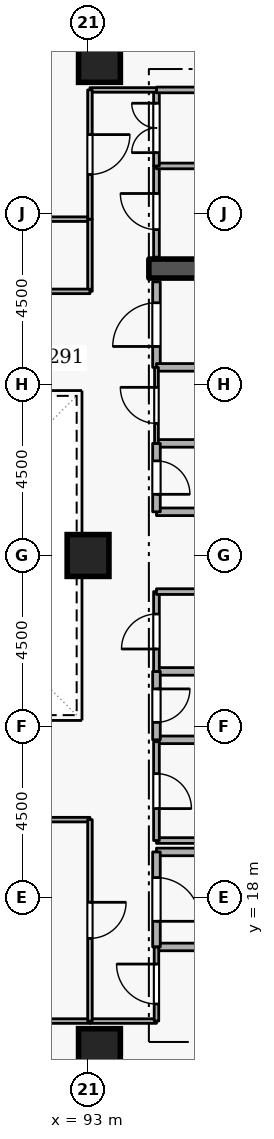
"""IFC4 building model, lengths in metres.
Left out: names, types, materials, properties, quantities, classifications, styles, units other than length and angle.
Written with IfcOpenShell. Run it as: python <this file> out.ifc"""

import sys

from ifc_helpers import new_model, si_unit, direction, frame, frame_2d, origin, origin_2d, place, context, subcontext, project, spatial, rectangle, extrude, element, fill, save


model = new_model("IFC4")
c1 = context("Model", 3, precision=1e-05, world=origin(), true_north=direction((0.0, 1.0)))
c2 = subcontext(c1, "Body", "Model", "MODEL_VIEW")
j1 = project(units=[si_unit("LENGTHUNIT", "METRE"), si_unit("PLANEANGLEUNIT", "RADIAN")], contexts=[c1])
p1 = place(None, origin())
s1 = spatial("IfcSite", under=j1, at=p1, CompositionType="ELEMENT")
p2 = place(p1, origin())
s2 = spatial("IfcBuilding", under=s1, at=p2, CompositionType="ELEMENT")
p3 = place(p2, frame((0.0, 0.0, 192.9)))
s3 = spatial("IfcBuildingStorey", under=s2, at=p3, CompositionType="ELEMENT", Elevation=192.9)
p4 = place(p3, frame((94.6, 34.55, 0.0), z_axis=(0.0, 0.0, 1.0), x_axis=(1.0, 0.0, 0.0)))
e1 = element("IfcWall", 1, at=p4, inside=s3, PredefinedType="SHEAR", context=c2, shape_type="SweptSolid", body=[
    extrude(rectangle(XDim=5.8, YDim=0.5, at=frame_2d((2.9, 0.0))), origin(), (0.0, 0.0, 1.0), 3.6),
])
for number, where, z_axis, x_axis in (
    (2, (93.3, 14.0, 0.0), (0.0, 0.0, 1.0), (1.0, 0.0, 0.0)),
    (3, (93.3, 40.0, 0.0), (0.0, 0.0, 1.0), (1.0, 0.0, 0.0)),
    (4, (93.0, 27.0, 0.0), (0.0, 0.0, 1.0), (1.0, 0.0, 0.0)),
):
    element("IfcColumn", number, at=place(p3, frame(where, z_axis=z_axis, x_axis=x_axis)), inside=s3, PredefinedType="COLUMN", context=c2, shape_type="SweptSolid", body=[
        extrude(rectangle(XDim=1.1, YDim=1.1, at=origin_2d()), origin(), (0.0, 0.0, 1.0), 3.6),
    ])
p5 = place(p3, frame((94.8, 16.7, 0.0), z_axis=(0.0, 0.0, 1.0), x_axis=(1.0, 0.0, 0.0)))
e5 = element("IfcWall", 5, at=p5, inside=s3, PredefinedType="STANDARD", context=c2, shape_type="SweptSolid", body=[
    extrude(rectangle(XDim=5.7, YDim=0.2, at=frame_2d((2.85, 0.0))), origin(), (0.0, 0.0, 1.0), 3.34),
])
p6 = place(p3, frame((97.1, 19.2, 0.0), z_axis=(0.0, 0.0, 1.0), x_axis=(-1.0, 0.0, 0.0)))
e6 = element("IfcWall", 6, at=p6, inside=s3, PredefinedType="STANDARD", context=c2, shape_type="SweptSolid", body=[
    extrude(rectangle(XDim=2.3, YDim=0.2, at=frame_2d((1.15, 0.0))), origin(), (0.0, 0.0, 1.0), 2.545),
])
p7 = place(p3, frame((94.8, 19.2, 0.0), z_axis=(0.0, 0.0, 1.0), x_axis=(0.0, -1.0, 0.0)))
e7 = element("IfcWall", 7, at=p7, inside=s3, PredefinedType="STANDARD", context=c2, shape_type="SweptSolid", body=[
    extrude(rectangle(XDim=2.5, YDim=0.2, at=frame_2d((1.25, 0.0))), origin(), (0.0, 0.0, 1.0), 3.34),
])
p8 = place(p7, frame((0.675, 0.0, 0.0)))
e8 = element("IfcOpeningElement", 8, at=p8, cuts=e7, PredefinedType="OPENING", context=c2, shape_type="SweptSolid", body=[
    extrude(rectangle(XDim=1.15, YDim=2.1, at=frame_2d((0.575, 1.05))), frame((0.0, 0.11, 0.0), z_axis=(0.0, -1.0, 0.0), x_axis=(1.0, 0.0, 0.0)), (0.0, 0.0, 1.0), 0.22),
])
for number, where, z_axis, x_axis in (
    (9, (94.8, 28.15, 0.0), (0.0, 0.0, 1.0), (1.0, 0.0, 0.0)),
    (10, (96.85, 29.95, 0.0), (0.0, 0.0, 1.0), (-1.0, 0.0, 0.0)),
):
    element("IfcWall", number, at=place(p3, frame(where, z_axis=z_axis, x_axis=x_axis)), inside=s3, PredefinedType="STANDARD", context=c2, shape_type="SweptSolid", body=[
        extrude(rectangle(XDim=2.05, YDim=0.2, at=frame_2d((1.025, 0.0))), origin(), (0.0, 0.0, 1.0), 3.34),
    ])
p9 = place(p3, frame((94.8, 29.95, 0.0), z_axis=(0.0, 0.0, 1.0), x_axis=(0.0, -1.0, 0.0)))
e11 = element("IfcWall", 11, at=p9, inside=s3, PredefinedType="STANDARD", context=c2, shape_type="SweptSolid", body=[
    extrude(rectangle(XDim=1.8, YDim=0.2, at=frame_2d((0.9, 0.0))), origin(), (0.0, 0.0, 1.0), 3.34),
])
p10 = place(p9, frame((0.46, 0.0, 0.0)))
e12 = element("IfcOpeningElement", 12, at=p10, cuts=e11, PredefinedType="OPENING", context=c2, shape_type="SweptSolid", body=[
    extrude(rectangle(XDim=0.88, YDim=2.04, at=frame_2d((0.44, 1.02))), frame((0.0, 0.11, 0.0), z_axis=(0.0, -1.0, 0.0), x_axis=(1.0, 0.0, 0.0)), (0.0, 0.0, 1.0), 0.22),
])
for number, where, z_axis, x_axis in (
    (13, (94.8, 22.15, 0.0), (0.0, 0.0, 1.0), (1.0, 0.0, 0.0)),
    (14, (96.85, 23.95, 0.0), (0.0, 0.0, 1.0), (-1.0, 0.0, 0.0)),
):
    element("IfcWall", number, at=place(p3, frame(where, z_axis=z_axis, x_axis=x_axis)), inside=s3, PredefinedType="STANDARD", context=c2, shape_type="SweptSolid", body=[
        extrude(rectangle(XDim=2.05, YDim=0.2, at=frame_2d((1.025, 0.0))), origin(), (0.0, 0.0, 1.0), 3.34),
    ])
p11 = place(p3, frame((94.8, 23.95, 0.0), z_axis=(0.0, 0.0, 1.0), x_axis=(0.0, -1.0, 0.0)))
e15 = element("IfcWall", 15, at=p11, inside=s3, PredefinedType="STANDARD", context=c2, shape_type="SweptSolid", body=[
    extrude(rectangle(XDim=1.8, YDim=0.2, at=frame_2d((0.9, 0.0))), origin(), (0.0, 0.0, 1.0), 3.34),
])
p12 = place(p11, frame((0.46, 0.0, 0.0)))
e16 = element("IfcOpeningElement", 16, at=p12, cuts=e15, PredefinedType="OPENING", context=c2, shape_type="SweptSolid", body=[
    extrude(rectangle(XDim=0.88, YDim=2.04, at=frame_2d((0.44, 1.02))), frame((0.0, 0.11, 0.0), z_axis=(0.0, -1.0, 0.0), x_axis=(1.0, 0.0, 0.0)), (0.0, 0.0, 1.0), 0.22),
])
p13 = place(p3, frame((94.8, 31.95, 0.0), z_axis=(0.0, 0.0, 1.0), x_axis=(0.0, 1.0, 0.0)))
e17 = element("IfcWall", 17, at=p13, inside=s3, PredefinedType="STANDARD", context=c2, shape_type="SweptSolid", body=[
    extrude(rectangle(XDim=2.25, YDim=0.2, at=frame_2d((1.125, 0.0))), origin(), (0.0, 0.0, 1.0), 3.34),
])
p14 = place(p13, frame((0.55, 0.0, 0.0)))
e18 = element("IfcOpeningElement", 18, at=p14, cuts=e17, PredefinedType="OPENING", context=c2, shape_type="SweptSolid", body=[
    extrude(rectangle(XDim=1.15, YDim=2.1, at=frame_2d((0.575, 1.05))), frame((0.0, 0.11, 0.0), z_axis=(0.0, -1.0, 0.0), x_axis=(1.0, 0.0, 0.0)), (0.0, 0.0, 1.0), 0.22),
])
p15 = place(p3, frame((96.85, 31.95, 0.0), z_axis=(0.0, 0.0, 1.0), x_axis=(-1.0, 0.0, 0.0)))
e19 = element("IfcWall", 19, at=p15, inside=s3, PredefinedType="STANDARD", context=c2, shape_type="SweptSolid", body=[
    extrude(rectangle(XDim=2.05, YDim=0.2, at=frame_2d((1.025, 0.0))), origin(), (0.0, 0.0, 1.0), 3.34),
])
p16 = place(p3, frame((94.8, 19.5, 0.0), z_axis=(0.0, 0.0, 1.0), x_axis=(1.0, 0.0, 0.0)))
e20 = element("IfcWall", 20, at=p16, inside=s3, PredefinedType="PARTITIONING", context=c2, shape_type="SweptSolid", body=[
    extrude(rectangle(XDim=2.05, YDim=0.15, at=frame_2d((1.025, 0.0))), origin(), (0.0, 0.0, 1.0), 2.545),
])
p17 = place(p3, frame((94.8, 22.1, 0.0), z_axis=(0.0, 0.0, 1.0), x_axis=(0.0, -1.0, 0.0)))
e21 = element("IfcWall", 21, at=p17, inside=s3, PredefinedType="PARTITIONING", context=c2, shape_type="SweptSolid", body=[
    extrude(rectangle(XDim=2.6, YDim=0.15, at=frame_2d((1.3, 0.0))), origin(), (0.0, 0.0, 1.0), 3.34),
])
p18 = place(p17, frame((0.84, 0.0, 0.0)))
e22 = element("IfcOpeningElement", 22, at=p18, cuts=e21, PredefinedType="OPENING", context=c2, shape_type="SweptSolid", body=[
    extrude(rectangle(XDim=0.92, YDim=2.08, at=frame_2d((0.46, 1.04))), frame((0.0, 0.085, 0.0), z_axis=(0.0, -1.0, 0.0), x_axis=(1.0, 0.0, 0.0)), (0.0, 0.0, 1.0), 0.17),
])
p19 = place(p3, frame((94.8, 23.95, 0.0), z_axis=(0.0, 0.0, 1.0), x_axis=(0.0, 1.0, 0.0)))
e23 = element("IfcWall", 23, at=p19, inside=s3, PredefinedType="PARTITIONING", context=c2, shape_type="SweptSolid", body=[
    extrude(rectangle(XDim=2.1, YDim=0.15, at=frame_2d((1.05, 0.0))), origin(), (0.0, 0.0, 1.0), 3.34),
])
p20 = place(p19, frame((0.59, 0.0, 0.0)))
e24 = element("IfcOpeningElement", 24, at=p20, cuts=e23, PredefinedType="OPENING", context=c2, shape_type="SweptSolid", body=[
    extrude(rectangle(XDim=0.92, YDim=2.08, at=frame_2d((0.46, 1.04))), frame((0.0, 0.085, 0.0), z_axis=(0.0, -1.0, 0.0), x_axis=(1.0, 0.0, 0.0)), (0.0, 0.0, 1.0), 0.17),
])
p21 = place(p3, frame((94.8, 26.05, 0.0), z_axis=(0.0, 0.0, 1.0), x_axis=(1.0, 0.0, 0.0)))
e25 = element("IfcWall", 25, at=p21, inside=s3, PredefinedType="PARTITIONING", context=c2, shape_type="SweptSolid", body=[
    extrude(rectangle(XDim=2.05, YDim=0.15, at=frame_2d((1.025, 0.0))), origin(), (0.0, 0.0, 1.0), 3.34),
])
p22 = place(p3, frame((94.8, 29.95, 0.0), z_axis=(0.0, 0.0, 1.0), x_axis=(0.0, 1.0, 0.0)))
e26 = element("IfcWall", 26, at=p22, inside=s3, PredefinedType="PARTITIONING", context=c2, shape_type="SweptSolid", body=[
    extrude(rectangle(XDim=2.0, YDim=0.1, at=frame_2d((1.0, 0.0))), origin(), (0.0, 0.0, 1.0), 3.34),
])
p23 = place(p22, frame((0.525, 0.0, 0.0)))
e27 = element("IfcOpeningElement", 27, at=p23, cuts=e26, PredefinedType="OPENING", context=c2, shape_type="SweptSolid", body=[
    extrude(rectangle(XDim=0.95, YDim=2.1, at=frame_2d((0.475, 1.05))), frame((0.0, 0.06, 0.0), z_axis=(0.0, -1.0, 0.0), x_axis=(1.0, 0.0, 0.0)), (0.0, 0.0, 1.0), 0.12),
])
p24 = place(p3, frame((94.8, 34.85, 0.0), z_axis=(0.0, 0.0, 1.0), x_axis=(0.0, 1.0, 0.0)))
e28 = element("IfcWall", 28, at=p24, inside=s3, PredefinedType="PARTITIONING", context=c2, shape_type="SweptSolid", body=[
    extrude(rectangle(XDim=2.4, YDim=0.15, at=frame_2d((1.2, 0.0))), origin(), (0.0, 0.0, 1.0), 3.34),
])
p25 = place(p24, frame((0.725, 0.0, 0.0)))
e29 = element("IfcOpeningElement", 29, at=p25, cuts=e28, PredefinedType="OPENING", context=c2, shape_type="SweptSolid", body=[
    extrude(rectangle(XDim=0.95, YDim=2.1, at=frame_2d((0.475, 1.05))), frame((0.0, 0.085, 0.0), z_axis=(0.0, -1.0, 0.0), x_axis=(1.0, 0.0, 0.0)), (0.0, 0.0, 1.0), 0.17),
])
p26 = place(p3, frame((94.8, 37.25, 0.0), z_axis=(0.0, 0.0, 1.0), x_axis=(1.0, 0.0, 0.0)))
e30 = element("IfcWall", 30, at=p26, inside=s3, PredefinedType="PARTITIONING", context=c2, shape_type="SweptSolid", body=[
    extrude(rectangle(XDim=5.65, YDim=0.15, at=frame_2d((2.825, 0.0))), origin(), (0.0, 0.0, 1.0), 3.34),
])
p27 = place(p3, frame((94.8, 37.25, 0.0), z_axis=(0.0, 0.0, 1.0), x_axis=(0.0, 1.0, 0.0)))
e31 = element("IfcWall", 31, at=p27, inside=s3, PredefinedType="PARTITIONING", context=c2, shape_type="SweptSolid", body=[
    extrude(rectangle(XDim=2.0, YDim=0.15, at=frame_2d((1.0, 0.0))), origin(), (0.0, 0.0, 1.0), 3.34),
])
p28 = place(p27, frame((0.35, 0.0, 0.0)))
e32 = element("IfcOpeningElement", 32, at=p28, cuts=e31, PredefinedType="OPENING", context=c2, shape_type="SweptSolid", body=[
    extrude(rectangle(XDim=1.3, YDim=2.12, at=frame_2d((0.65, 1.06))), frame((0.0, 0.085, 0.0), z_axis=(0.0, -1.0, 0.0), x_axis=(1.0, 0.0, 0.0)), (0.0, 0.0, 1.0), 0.17),
])
p29 = place(p3, frame((94.8, 39.25, 0.0), z_axis=(0.0, 0.0, 1.0), x_axis=(1.0, 0.0, 0.0)))
e33 = element("IfcWall", 33, at=p29, inside=s3, PredefinedType="PARTITIONING", context=c2, shape_type="SweptSolid", body=[
    extrude(rectangle(XDim=5.65, YDim=0.15, at=frame_2d((2.825, 0.0))), origin(), (0.0, 0.0, 1.0), 3.34),
])
p30 = place(p3, frame((88.5, 14.75, 0.0), z_axis=(0.0, 0.0, 1.0), x_axis=(1.0, 0.0, 0.0)))
e34 = element("IfcWall", 34, at=p30, inside=s3, PredefinedType="PARTITIONING", context=c2, shape_type="SweptSolid", body=[
    extrude(rectangle(XDim=4.55, YDim=0.12, at=frame_2d((2.275, 0.0))), origin(), (0.0, 0.0, 1.0), 3.34),
])
p31 = place(p3, frame((93.05, 14.75, 0.0), z_axis=(0.0, 0.0, 1.0), x_axis=(1.0, 0.0, 0.0)))
e35 = element("IfcWall", 35, at=p31, inside=s3, PredefinedType="PARTITIONING", context=c2, shape_type="SweptSolid", body=[
    extrude(rectangle(XDim=1.75, YDim=0.12, at=frame_2d((0.875, 0.0))), origin(), (0.0, 0.0, 1.0), 3.34),
])
p32 = place(p3, frame((94.8, 14.75, 0.0), z_axis=(0.0, 0.0, 1.0), x_axis=(0.0, 1.0, 0.0)))
e36 = element("IfcWall", 36, at=p32, inside=s3, PredefinedType="PARTITIONING", context=c2, shape_type="SweptSolid", body=[
    extrude(rectangle(XDim=1.95, YDim=0.12, at=frame_2d((0.975, 0.0))), origin(), (0.0, 0.0, 1.0), 3.34),
])
p33 = place(p32, frame((0.45, 0.0, 0.0)))
e37 = element("IfcOpeningElement", 37, at=p33, cuts=e36, PredefinedType="OPENING", context=c2, shape_type="SweptSolid", body=[
    extrude(rectangle(XDim=1.05, YDim=2.1, at=frame_2d((0.525, 1.05))), frame((0.0, 0.07, 0.0), z_axis=(0.0, -1.0, 0.0), x_axis=(1.0, 0.0, 0.0)), (0.0, 0.0, 1.0), 0.14),
])
p34 = place(p3, frame((88.5, 20.05, 0.0), z_axis=(0.0, 0.0, 1.0), x_axis=(1.0, 0.0, 0.0)))
e38 = element("IfcWall", 38, at=p34, inside=s3, PredefinedType="PARTITIONING", context=c2, shape_type="SweptSolid", body=[
    extrude(rectangle(XDim=4.55, YDim=0.12, at=frame_2d((2.275, 0.0))), origin(), (0.0, 0.0, 1.0), 3.34),
])
p35 = place(p3, frame((93.05, 20.05, 0.0), z_axis=(0.0, 0.0, 1.0), x_axis=(0.0, -1.0, 0.0)))
e39 = element("IfcWall", 39, at=p35, inside=s3, PredefinedType="PARTITIONING", context=c2, shape_type="SweptSolid", body=[
    extrude(rectangle(XDim=5.3, YDim=0.12, at=frame_2d((2.65, 0.0))), origin(), (0.0, 0.0, 1.0), 3.34),
])
p36 = place(p35, frame((2.175, 0.0, 0.0)))
e40 = element("IfcOpeningElement", 40, at=p36, cuts=e39, PredefinedType="OPENING", context=c2, shape_type="SweptSolid", body=[
    extrude(rectangle(XDim=0.95, YDim=2.1, at=frame_2d((0.475, 1.05))), frame((0.0, 0.07, 0.0), z_axis=(0.0, -1.0, 0.0), x_axis=(1.0, 0.0, 0.0)), (0.0, 0.0, 1.0), 0.14),
])
p37 = place(p3, frame((88.5, 35.85, 0.0), z_axis=(0.0, 0.0, 1.0), x_axis=(1.0, 0.0, 0.0)))
e41 = element("IfcWall", 41, at=p37, inside=s3, PredefinedType="PARTITIONING", context=c2, shape_type="SweptSolid", body=[
    extrude(rectangle(XDim=4.55, YDim=0.12, at=frame_2d((2.275, 0.0))), origin(), (0.0, 0.0, 1.0), 3.34),
])
p38 = place(p3, frame((93.05, 35.85, 0.0), z_axis=(0.0, 0.0, 1.0), x_axis=(0.0, -1.0, 0.0)))
e42 = element("IfcWall", 42, at=p38, inside=s3, PredefinedType="PARTITIONING", context=c2, shape_type="SweptSolid", body=[
    extrude(rectangle(XDim=1.9, YDim=0.12, at=frame_2d((0.95, 0.0))), origin(), (0.0, 0.0, 1.0), 3.34),
])
p39 = place(p3, frame((93.05, 33.95, 0.0), z_axis=(0.0, 0.0, 1.0), x_axis=(-1.0, 0.0, 0.0)))
e43 = element("IfcWall", 43, at=p39, inside=s3, PredefinedType="PARTITIONING", context=c2, shape_type="SweptSolid", body=[
    extrude(rectangle(XDim=4.55, YDim=0.12, at=frame_2d((2.275, 0.0))), origin(), (0.0, 0.0, 1.0), 3.34),
])
p40 = place(p39, frame((1.8, 0.0, 0.0)))
e44 = element("IfcOpeningElement", 44, at=p40, cuts=e43, PredefinedType="OPENING", context=c2, shape_type="SweptSolid", body=[
    extrude(rectangle(XDim=0.95, YDim=2.1, at=frame_2d((0.475, 1.05))), frame((0.0, 0.07, 0.0), z_axis=(0.0, -1.0, 0.0), x_axis=(1.0, 0.0, 0.0)), (0.0, 0.0, 1.0), 0.14),
])
p41 = place(p3, frame((94.8, 39.25, 0.0), z_axis=(0.0, 0.0, 1.0), x_axis=(-1.0, 0.0, 0.0)))
e45 = element("IfcWall", 45, at=p41, inside=s3, PredefinedType="PARTITIONING", context=c2, shape_type="SweptSolid", body=[
    extrude(rectangle(XDim=1.75, YDim=0.12, at=frame_2d((0.875, 0.0))), origin(), (0.0, 0.0, 1.0), 3.34),
])
p42 = place(p3, frame((93.05, 39.25, 0.0), z_axis=(0.0, 0.0, 1.0), x_axis=(0.0, -1.0, 0.0)))
e46 = element("IfcWall", 46, at=p42, inside=s3, PredefinedType="PARTITIONING", context=c2, shape_type="SweptSolid", body=[
    extrude(rectangle(XDim=3.4, YDim=0.12, at=frame_2d((1.7, 0.0))), origin(), (0.0, 0.0, 1.0), 3.34),
])
p43 = place(p42, frame((1.175, 0.0, 0.0)))
e47 = element("IfcOpeningElement", 47, at=p43, cuts=e46, PredefinedType="OPENING", context=c2, shape_type="SweptSolid", body=[
    extrude(rectangle(XDim=1.05, YDim=2.1, at=frame_2d((0.525, 1.05))), frame((0.0, 0.07, 0.0), z_axis=(0.0, -1.0, 0.0), x_axis=(1.0, 0.0, 0.0)), (0.0, 0.0, 1.0), 0.14),
])
p44 = place(p8, origin())
e48 = element("IfcDoor", 48, at=p44, inside=s3, OperationType="SINGLE_SWING_RIGHT", PredefinedType="DOOR", context=c2, shape_type="SweptSolid", body=[
    extrude(rectangle(XDim=1.15, YDim=2.1, at=frame_2d((0.575, 1.05))), frame((0.0, 0.025, 0.0), z_axis=(0.0, -1.0, 0.0), x_axis=(1.0, 0.0, 0.0)), (0.0, 0.0, 1.0), 0.05),
])
fill(e8, e48)
p45 = place(p10, origin())
e49 = element("IfcDoor", 49, at=p45, inside=s3, OperationType="SINGLE_SWING_RIGHT", PredefinedType="DOOR", context=c2, shape_type="SweptSolid", body=[
    extrude(rectangle(XDim=0.88, YDim=2.04, at=frame_2d((0.44, 1.02))), frame((0.0, 0.025, 0.0), z_axis=(0.0, -1.0, 0.0), x_axis=(1.0, 0.0, 0.0)), (0.0, 0.0, 1.0), 0.05),
])
fill(e12, e49)
p46 = place(p12, origin())
e50 = element("IfcDoor", 50, at=p46, inside=s3, OperationType="SINGLE_SWING_LEFT", PredefinedType="DOOR", context=c2, shape_type="SweptSolid", body=[
    extrude(rectangle(XDim=0.88, YDim=2.04, at=frame_2d((0.44, 1.02))), frame((0.0, 0.025, 0.0), z_axis=(0.0, -1.0, 0.0), x_axis=(1.0, 0.0, 0.0)), (0.0, 0.0, 1.0), 0.05),
])
fill(e16, e50)
p47 = place(p18, origin())
e51 = element("IfcDoor", 51, at=p47, inside=s3, OperationType="SINGLE_SWING_RIGHT", PredefinedType="DOOR", context=c2, shape_type="SweptSolid", body=[
    extrude(rectangle(XDim=0.92, YDim=2.08, at=frame_2d((0.46, 1.04))), frame((0.0, 0.025, 0.0), z_axis=(0.0, -1.0, 0.0), x_axis=(1.0, 0.0, 0.0)), (0.0, 0.0, 1.0), 0.05),
])
fill(e22, e51)
p48 = place(p20, origin())
e52 = element("IfcDoor", 52, at=p48, inside=s3, OperationType="SINGLE_SWING_LEFT", PredefinedType="DOOR", context=c2, shape_type="SweptSolid", body=[
    extrude(rectangle(XDim=0.92, YDim=2.08, at=frame_2d((0.46, 1.04))), frame((0.0, 0.025, 0.0), z_axis=(0.0, -1.0, 0.0), x_axis=(1.0, 0.0, 0.0)), (0.0, 0.0, 1.0), 0.05),
])
fill(e24, e52)
p49 = place(p23, origin())
e53 = element("IfcDoor", 53, at=p49, inside=s3, OperationType="SINGLE_SWING_RIGHT", PredefinedType="DOOR", context=c2, shape_type="SweptSolid", body=[
    extrude(rectangle(XDim=0.95, YDim=2.1, at=frame_2d((0.475, 1.05))), frame((0.0, 0.025, 0.0), z_axis=(0.0, -1.0, 0.0), x_axis=(1.0, 0.0, 0.0)), (0.0, 0.0, 1.0), 0.05),
])
fill(e27, e53)
p50 = place(p14, origin())
e54 = element("IfcDoor", 54, at=p50, inside=s3, OperationType="SINGLE_SWING_LEFT", PredefinedType="DOOR", context=c2, shape_type="SweptSolid", body=[
    extrude(rectangle(XDim=1.15, YDim=2.1, at=frame_2d((0.575, 1.05))), frame((0.0, 0.025, 0.0), z_axis=(0.0, -1.0, 0.0), x_axis=(1.0, 0.0, 0.0)), (0.0, 0.0, 1.0), 0.05),
])
fill(e18, e54)
p51 = place(p25, origin())
e55 = element("IfcDoor", 55, at=p51, inside=s3, OperationType="SINGLE_SWING_RIGHT", PredefinedType="DOOR", context=c2, shape_type="SweptSolid", body=[
    extrude(rectangle(XDim=0.95, YDim=2.1, at=frame_2d((0.475, 1.05))), frame((0.0, 0.025, 0.0), z_axis=(0.0, -1.0, 0.0), x_axis=(1.0, 0.0, 0.0)), (0.0, 0.0, 1.0), 0.05),
])
fill(e29, e55)
p52 = place(p28, origin())
e56 = element("IfcDoor", 56, at=p52, inside=s3, OperationType="DOUBLE_DOOR_SINGLE_SWING", PredefinedType="DOOR", context=c2, shape_type="SweptSolid", body=[
    extrude(rectangle(XDim=1.3, YDim=2.12, at=frame_2d((0.65, 1.06))), frame((0.0, 0.025, 0.0), z_axis=(0.0, -1.0, 0.0), x_axis=(1.0, 0.0, 0.0)), (0.0, 0.0, 1.0), 0.05),
])
fill(e32, e56)
p53 = place(p33, origin())
e57 = element("IfcDoor", 57, at=p53, inside=s3, OperationType="SINGLE_SWING_RIGHT", PredefinedType="DOOR", context=c2, shape_type="SweptSolid", body=[
    extrude(rectangle(XDim=1.05, YDim=2.1, at=frame_2d((0.525, 1.05))), frame((0.0, 0.025, 0.0), z_axis=(0.0, -1.0, 0.0), x_axis=(1.0, 0.0, 0.0)), (0.0, 0.0, 1.0), 0.05),
])
fill(e37, e57)
p54 = place(p36, origin())
e58 = element("IfcDoor", 58, at=p54, inside=s3, OperationType="SINGLE_SWING_LEFT", PredefinedType="DOOR", context=c2, shape_type="SweptSolid", body=[
    extrude(rectangle(XDim=0.95, YDim=2.1, at=frame_2d((0.475, 1.05))), frame((0.0, 0.025, 0.0), z_axis=(0.0, -1.0, 0.0), x_axis=(1.0, 0.0, 0.0)), (0.0, 0.0, 1.0), 0.05),
])
fill(e40, e58)
p55 = place(p43, origin())
e59 = element("IfcDoor", 59, at=p55, inside=s3, OperationType="SINGLE_SWING_LEFT", PredefinedType="DOOR", context=c2, shape_type="SweptSolid", body=[
    extrude(rectangle(XDim=1.05, YDim=2.1, at=frame_2d((0.525, 1.05))), frame((0.0, 0.025, 0.0), z_axis=(0.0, -1.0, 0.0), x_axis=(1.0, 0.0, 0.0)), (0.0, 0.0, 1.0), 0.05),
])
fill(e47, e59)
save(model, sys.argv[1])
